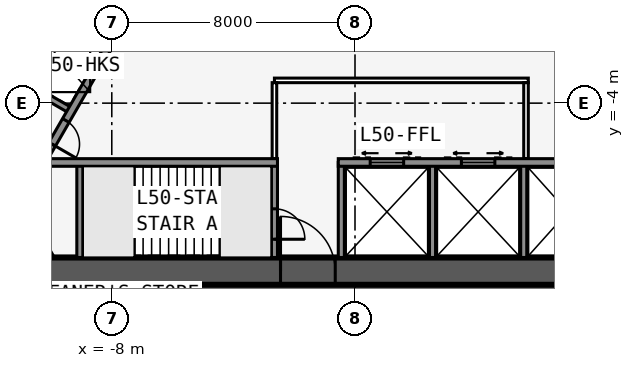
"""IFC4 building model, lengths in metres.
Left out: names, types, materials, properties, quantities, classifications, styles, units other than length and angle.
Written with IfcOpenShell. Run it as: python <this file> out.ifc"""

import sys

from ifc_helpers import new_model, si_unit, direction, frame, frame_2d, origin, place, context, subcontext, project, spatial, rectangle, extrude, element, fill, save


model = new_model("IFC4")
c1 = context("Model", 3, precision=1e-05, world=origin(), true_north=direction((0.0, 1.0)))
c2 = subcontext(c1, "Body", "Model", "MODEL_VIEW")
j1 = project(units=[si_unit("LENGTHUNIT", "METRE"), si_unit("PLANEANGLEUNIT", "RADIAN")], contexts=[c1])
p1 = place(None, origin())
s1 = spatial("IfcSite", under=j1, at=p1, CompositionType="ELEMENT")
p2 = place(p1, origin())
s2 = spatial("IfcBuilding", under=s1, at=p2, CompositionType="ELEMENT")
p3 = place(p2, frame((0.0, 0.0, 186.1)))
s3 = spatial("IfcBuildingStorey", under=s2, at=p3, CompositionType="ELEMENT", Elevation=186.1)
p4 = place(p3, frame((-16.5, -9.526, 0.0), z_axis=(0.0, 0.0, 1.0), x_axis=(1.0, 0.0, 0.0)))
e1 = element("IfcWall", 1, at=p4, inside=s3, PredefinedType="SHEAR", context=c2, shape_type="SweptSolid", body=[
    extrude(rectangle(XDim=33.0, YDim=0.9, at=frame_2d((16.5, 0.0))), origin(), (0.0, 0.0, 1.0), 3.4),
])
p5 = place(p4, frame((14.05, 0.0, 0.0)))
e2 = element("IfcOpeningElement", 2, at=p5, cuts=e1, PredefinedType="OPENING", context=c2, shape_type="SweptSolid", body=[
    extrude(rectangle(XDim=1.8, YDim=2.13, at=frame_2d((0.9, 1.065))), frame((0.0, 0.46, 0.0), z_axis=(0.0, -1.0, 0.0), x_axis=(1.0, 0.0, 0.0)), (0.0, 0.0, 1.0), 0.92),
])
p6 = place(p3, frame((-10.183, -5.951, 0.0), z_axis=(0.0, 0.0, 1.0), x_axis=(1.0, 0.0, 0.0)))
e3 = element("IfcWall", 3, at=p6, inside=s3, PredefinedType="SOLIDWALL", context=c2, shape_type="SweptSolid", body=[
    extrude(rectangle(XDim=7.633, YDim=0.25, at=frame_2d((3.816, 0.0))), origin(), (0.0, 0.0, 1.0), 3.15),
])
p7 = place(p3, frame((-0.55, -5.951, 0.0), z_axis=(0.0, 0.0, 1.0), x_axis=(1.0, 0.0, 0.0)))
e4 = element("IfcWall", 4, at=p7, inside=s3, PredefinedType="SOLIDWALL", context=c2, shape_type="SweptSolid", body=[
    extrude(rectangle(XDim=10.733, YDim=0.25, at=frame_2d((5.366, 0.0))), origin(), (0.0, 0.0, 1.0), 3.15),
])
p8 = place(p7, frame((9.314, 0.0, 0.0)))
e5 = element("IfcOpeningElement", 5, at=p8, cuts=e4, PredefinedType="OPENING", context=c2, shape_type="SweptSolid", body=[
    extrude(rectangle(XDim=0.9, YDim=2.13, at=frame_2d((0.45, 1.065))), frame((0.0, 0.135, 0.0), z_axis=(0.0, -1.0, 0.0), x_axis=(1.0, 0.0, 0.0)), (0.0, 0.0, 1.0), 0.27),
])
p9 = place(p7, frame((1.05, 0.0, 0.0)))
e6 = element("IfcOpeningElement", 6, at=p9, cuts=e4, PredefinedType="OPENING", context=c2, shape_type="SweptSolid", body=[
    extrude(rectangle(XDim=1.1, YDim=2.13, at=frame_2d((0.55, 1.065))), frame((0.0, 0.135, 0.0), z_axis=(0.0, -1.0, 0.0), x_axis=(1.0, 0.0, 0.0)), (0.0, 0.0, 1.0), 0.27),
])
p10 = place(p7, frame((4.05, 0.0, 0.0)))
e7 = element("IfcOpeningElement", 7, at=p10, cuts=e4, PredefinedType="OPENING", context=c2, shape_type="SweptSolid", body=[
    extrude(rectangle(XDim=1.1, YDim=2.13, at=frame_2d((0.55, 1.065))), frame((0.0, 0.135, 0.0), z_axis=(0.0, -1.0, 0.0), x_axis=(1.0, 0.0, 0.0)), (0.0, 0.0, 1.0), 0.27),
])
p11 = place(p3, frame((-9.05, -5.951, 0.0), z_axis=(0.0, 0.0, 1.0), x_axis=(0.0, -1.0, 0.0)))
e8 = element("IfcWall", 8, at=p11, inside=s3, PredefinedType="SOLIDWALL", context=c2, shape_type="SweptSolid", body=[
    extrude(rectangle(XDim=3.125, YDim=0.2, at=frame_2d((1.562, 0.0))), origin(), (0.0, 0.0, 1.0), 3.15),
])
p12 = place(p3, frame((-2.65, -5.951, 0.0), z_axis=(0.0, 0.0, 1.0), x_axis=(0.0, -1.0, 0.0)))
e9 = element("IfcWall", 9, at=p12, inside=s3, PredefinedType="SOLIDWALL", context=c2, shape_type="SweptSolid", body=[
    extrude(rectangle(XDim=3.125, YDim=0.2, at=frame_2d((1.562, 0.0))), origin(), (0.0, 0.0, 1.0), 3.15),
])
p13 = place(p12, frame((1.525, 0.0, 0.0)))
e10 = element("IfcOpeningElement", 10, at=p13, cuts=e9, PredefinedType="OPENING", context=c2, shape_type="SweptSolid", body=[
    extrude(rectangle(XDim=1.0, YDim=2.13, at=frame_2d((0.5, 1.065))), frame((0.0, 0.11, 0.0), z_axis=(0.0, -1.0, 0.0), x_axis=(1.0, 0.0, 0.0)), (0.0, 0.0, 1.0), 0.22),
])
for number, where, z_axis, x_axis in (
    (11, (-0.45, -5.951, 0.0), (0.0, 0.0, 1.0), (0.0, -1.0, 0.0)),
    (12, (2.55, -5.951, 0.0), (0.0, 0.0, 1.0), (0.0, -1.0, 0.0)),
    (13, (5.55, -5.951, 0.0), (0.0, 0.0, 1.0), (0.0, -1.0, 0.0)),
):
    element("IfcWall", number, at=place(p3, frame(where, z_axis=z_axis, x_axis=x_axis)), inside=s3, PredefinedType="SOLIDWALL", context=c2, shape_type="SweptSolid", body=[
        extrude(rectangle(XDim=3.125, YDim=0.2, at=frame_2d((1.562, 0.0))), origin(), (0.0, 0.0, 1.0), 3.15),
    ])
p14 = place(p3, frame((16.5, -9.526, 0.0), z_axis=(0.0, 0.0, 1.0), x_axis=(-0.499999749417, 0.866025548458, 0.0)))
e14 = element("IfcWall", 14, at=p14, inside=s3, PredefinedType="SHEAR", context=c2, shape_type="SweptSolid", body=[
    extrude(rectangle(XDim=33.0, YDim=0.9, at=frame_2d((16.5, 0.0))), origin(), (0.0, 0.0, 1.0), 3.4),
])
p15 = place(p14, frame((14.15, 0.0, 0.0)))
e15 = element("IfcOpeningElement", 15, at=p15, cuts=e14, PredefinedType="OPENING", context=c2, shape_type="SweptSolid", body=[
    extrude(rectangle(XDim=1.8, YDim=2.13, at=frame_2d((0.9, 1.065))), frame((0.0, 0.46, 0.0), z_axis=(0.0, -1.0, 0.0), x_axis=(1.0, 0.0, 0.0)), (0.0, 0.0, 1.0), 0.92),
])
p16 = place(p14, frame((12.6, 0.0, 0.0)))
e16 = element("IfcOpeningElement", 16, at=p16, cuts=e14, PredefinedType="OPENING", context=c2, shape_type="SweptSolid", body=[
    extrude(rectangle(XDim=1.0, YDim=2.13, at=frame_2d((0.5, 1.065))), frame((0.0, 0.46, 0.0), z_axis=(0.0, -1.0, 0.0), x_axis=(1.0, 0.0, 0.0)), (0.0, 0.0, 1.0), 0.92),
])
p17 = place(p3, frame((10.245, -5.843, 0.0), z_axis=(0.0, 0.0, 1.0), x_axis=(-0.499993009313, 0.866029439822, 0.0)))
e17 = element("IfcWall", 17, at=p17, inside=s3, PredefinedType="SOLIDWALL", context=c2, shape_type="SweptSolid", body=[
    extrude(rectangle(XDim=7.733, YDim=0.25, at=frame_2d((3.866, 0.0))), origin(), (0.0, 0.0, 1.0), 3.15),
])
p18 = place(p3, frame((0.0, 19.052, 0.0), z_axis=(0.0, 0.0, 1.0), x_axis=(-0.499999749417, -0.866025548458, 0.0)))
e18 = element("IfcWall", 18, at=p18, inside=s3, PredefinedType="SHEAR", context=c2, shape_type="SweptSolid", body=[
    extrude(rectangle(XDim=33.0, YDim=0.9, at=frame_2d((16.5, 0.0))), origin(), (0.0, 0.0, 1.0), 3.4),
])
p19 = place(p18, frame((14.15, 0.0, 0.0)))
e19 = element("IfcOpeningElement", 19, at=p19, cuts=e18, PredefinedType="OPENING", context=c2, shape_type="SweptSolid", body=[
    extrude(rectangle(XDim=1.8, YDim=2.13, at=frame_2d((0.9, 1.065))), frame((0.0, 0.46, 0.0), z_axis=(0.0, -1.0, 0.0), x_axis=(1.0, 0.0, 0.0)), (0.0, 0.0, 1.0), 0.92),
])
p20 = place(p18, frame((12.6, 0.0, 0.0)))
e20 = element("IfcOpeningElement", 20, at=p20, cuts=e18, PredefinedType="OPENING", context=c2, shape_type="SweptSolid", body=[
    extrude(rectangle(XDim=1.0, YDim=2.13, at=frame_2d((0.5, 1.065))), frame((0.0, 0.46, 0.0), z_axis=(0.0, -1.0, 0.0), x_axis=(1.0, 0.0, 0.0)), (0.0, 0.0, 1.0), 0.92),
])
p21 = place(p3, frame((-4.929, 3.365, 0.0), z_axis=(0.0, 0.0, 1.0), x_axis=(-0.499991433582, -0.866030349552, 0.0)))
e21 = element("IfcWall", 21, at=p21, inside=s3, PredefinedType="SOLIDWALL", context=c2, shape_type="SweptSolid", body=[
    extrude(rectangle(XDim=10.633, YDim=0.25, at=frame_2d((5.316, 0.0))), origin(), (0.0, 0.0, 1.0), 3.15),
])
p22 = place(p21, frame((9.164, 0.0, 0.0)))
e22 = element("IfcOpeningElement", 22, at=p22, cuts=e21, PredefinedType="OPENING", context=c2, shape_type="SweptSolid", body=[
    extrude(rectangle(XDim=0.9, YDim=2.13, at=frame_2d((0.45, 1.065))), frame((0.0, 0.135, 0.0), z_axis=(0.0, -1.0, 0.0), x_axis=(1.0, 0.0, 0.0)), (0.0, 0.0, 1.0), 0.27),
])
p23 = place(p3, frame((-9.329, -4.256, 0.0), z_axis=(0.0, 0.0, 1.0), x_axis=(-0.866022959057, 0.500004234368, 0.0)))
e23 = element("IfcWall", 23, at=p23, inside=s3, PredefinedType="SOLIDWALL", context=c2, shape_type="SweptSolid", body=[
    extrude(rectangle(XDim=3.125, YDim=0.2, at=frame_2d((1.562, 0.0))), origin(), (0.0, 0.0, 1.0), 3.15),
])
p24 = place(p3, frame((20.027, -10.985, 0.0), z_axis=(0.0, 0.0, 1.0), x_axis=(-0.500001677587, 0.866024435227, 0.0)))
e24 = element("IfcWall", 24, at=p24, inside=s3, PredefinedType="PARTITIONING", context=c2, shape_type="SweptSolid", body=[
    extrude(rectangle(XDim=39.054, YDim=0.15, at=frame_2d((19.527, 0.0))), origin(), (0.0, 0.0, 1.0), 3.15),
])
p25 = place(p24, frame((1.558, 0.0, 0.0)))
e25 = element("IfcOpeningElement", 25, at=p25, cuts=e24, PredefinedType="OPENING", context=c2, shape_type="SweptSolid", body=[
    extrude(rectangle(XDim=0.95, YDim=2.13, at=frame_2d((0.475, 1.065))), frame((0.0, 0.085, 0.0), z_axis=(0.0, -1.0, 0.0), x_axis=(1.0, 0.0, 0.0)), (0.0, 0.0, 1.0), 0.17),
])
p26 = place(p24, frame((12.752, 0.0, 0.0)))
e26 = element("IfcOpeningElement", 26, at=p26, cuts=e24, PredefinedType="OPENING", context=c2, shape_type="SweptSolid", body=[
    extrude(rectangle(XDim=0.95, YDim=2.13, at=frame_2d((0.475, 1.065))), frame((0.0, 0.085, 0.0), z_axis=(0.0, -1.0, 0.0), x_axis=(1.0, 0.0, 0.0)), (0.0, 0.0, 1.0), 0.17),
])
p27 = place(p24, frame((26.552, 0.0, 0.0)))
e27 = element("IfcOpeningElement", 27, at=p27, cuts=e24, PredefinedType="OPENING", context=c2, shape_type="SweptSolid", body=[
    extrude(rectangle(XDim=0.95, YDim=2.13, at=frame_2d((0.475, 1.065))), frame((0.0, 0.085, 0.0), z_axis=(0.0, -1.0, 0.0), x_axis=(1.0, 0.0, 0.0)), (0.0, 0.0, 1.0), 0.17),
])
p28 = place(p24, frame((37.752, 0.0, 0.0)))
e28 = element("IfcOpeningElement", 28, at=p28, cuts=e24, PredefinedType="OPENING", context=c2, shape_type="SweptSolid", body=[
    extrude(rectangle(XDim=0.95, YDim=2.13, at=frame_2d((0.475, 1.065))), frame((0.0, 0.085, 0.0), z_axis=(0.0, -1.0, 0.0), x_axis=(1.0, 0.0, 0.0)), (0.0, 0.0, 1.0), 0.17),
])
p29 = place(p3, frame((-0.5, 24.636, 0.0), z_axis=(0.0, 0.0, 1.0), x_axis=(-0.500001915564, -0.86602429783, 0.0)))
e29 = element("IfcWall", 29, at=p29, inside=s3, PredefinedType="PARTITIONING", context=c2, shape_type="SweptSolid", body=[
    extrude(rectangle(XDim=42.172, YDim=0.15, at=frame_2d((21.086, 0.0))), origin(), (0.0, 0.0, 1.0), 3.15),
])
p30 = place(p29, frame((2.338, 0.0, 0.0)))
e30 = element("IfcOpeningElement", 30, at=p30, cuts=e29, PredefinedType="OPENING", context=c2, shape_type="SweptSolid", body=[
    extrude(rectangle(XDim=0.95, YDim=2.13, at=frame_2d((0.475, 1.065))), frame((0.0, 0.085, 0.0), z_axis=(0.0, -1.0, 0.0), x_axis=(1.0, 0.0, 0.0)), (0.0, 0.0, 1.0), 0.17),
])
p31 = place(p29, frame((18.111, 0.0, 0.0)))
e31 = element("IfcOpeningElement", 31, at=p31, cuts=e29, PredefinedType="OPENING", context=c2, shape_type="SweptSolid", body=[
    extrude(rectangle(XDim=0.95, YDim=2.13, at=frame_2d((0.475, 1.065))), frame((0.0, 0.085, 0.0), z_axis=(0.0, -1.0, 0.0), x_axis=(1.0, 0.0, 0.0)), (0.0, 0.0, 1.0), 0.17),
])
p32 = place(p29, frame((28.111, 0.0, 0.0)))
e32 = element("IfcOpeningElement", 32, at=p32, cuts=e29, PredefinedType="OPENING", context=c2, shape_type="SweptSolid", body=[
    extrude(rectangle(XDim=0.95, YDim=2.13, at=frame_2d((0.475, 1.065))), frame((0.0, 0.085, 0.0), z_axis=(0.0, -1.0, 0.0), x_axis=(1.0, 0.0, 0.0)), (0.0, 0.0, 1.0), 0.17),
])
p33 = place(p29, frame((39.311, 0.0, 0.0)))
e33 = element("IfcOpeningElement", 33, at=p33, cuts=e29, PredefinedType="OPENING", context=c2, shape_type="SweptSolid", body=[
    extrude(rectangle(XDim=0.95, YDim=2.13, at=frame_2d((0.475, 1.065))), frame((0.0, 0.085, 0.0), z_axis=(0.0, -1.0, 0.0), x_axis=(1.0, 0.0, 0.0)), (0.0, 0.0, 1.0), 0.17),
])
p34 = place(p3, frame((-2.65, -3.251, 0.0), z_axis=(0.0, 0.0, 1.0), x_axis=(1.0, 0.0, 0.0)))
e34 = element("IfcWall", 34, at=p34, inside=s3, PredefinedType="PARTITIONING", context=c2, shape_type="SweptSolid", body=[
    extrude(rectangle(XDim=8.35, YDim=0.15, at=frame_2d((4.175, 0.0))), origin(), (0.0, 0.0, 1.0), 3.15),
])
for number, where, z_axis, x_axis in (
    (35, (-2.65, -5.826, 0.0), (0.0, 0.0, 1.0), (0.0, 1.0, 0.0)),
    (36, (5.625, -5.826, 0.0), (0.0, 0.0, 1.0), (0.0, 1.0, 0.0)),
):
    element("IfcWall", number, at=place(p3, frame(where, z_axis=z_axis, x_axis=x_axis)), inside=s3, PredefinedType="PARTITIONING", context=c2, shape_type="SweptSolid", body=[
        extrude(rectangle(XDim=2.5, YDim=0.15, at=frame_2d((1.25, 0.0))), origin(), (0.0, 0.0, 1.0), 3.15),
    ])
p35 = place(p3, frame((-9.947, -9.076, 0.0), z_axis=(0.0, 0.0, 1.0), x_axis=(-0.500027479704, 0.866009537788, 0.0)))
e37 = element("IfcWall", 37, at=p35, inside=s3, PredefinedType="PARTITIONING", context=c2, shape_type="SweptSolid", body=[
    extrude(rectangle(XDim=5.774, YDim=0.1, at=frame_2d((2.887, 0.0))), origin(), (0.0, 0.0, 1.0), 3.15),
])
p36 = place(p35, frame((2.437, 0.0, 0.0)))
e38 = element("IfcOpeningElement", 38, at=p36, cuts=e37, PredefinedType="OPENING", context=c2, shape_type="SweptSolid", body=[
    extrude(rectangle(XDim=0.9, YDim=2.13, at=frame_2d((0.45, 1.065))), frame((0.0, 0.06, 0.0), z_axis=(0.0, -1.0, 0.0), x_axis=(1.0, 0.0, 0.0)), (0.0, 0.0, 1.0), 0.12),
])
p37 = place(p3, frame((-7.247, -7.576, 0.0), z_axis=(0.0, 0.0, 1.0), x_axis=(1.0, 0.0, 0.0)))
e39 = element("IfcWall", 39, at=p37, inside=s3, PredefinedType="SOLIDWALL", context=c2, shape_type="SweptSolid", body=[
    extrude(rectangle(XDim=2.794, YDim=0.1, at=frame_2d((1.397, 0.0))), origin(), (0.0, 0.0, 1.0), 3.4),
])
p38 = place(p5, origin())
e40 = element("IfcDoor", 40, at=p38, inside=s3, OperationType="DOUBLE_DOOR_SINGLE_SWING", PredefinedType="DOOR", context=c2, shape_type="SweptSolid", body=[
    extrude(rectangle(XDim=1.8, YDim=2.13, at=frame_2d((0.9, 1.065))), frame((0.0, 0.025, 0.0), z_axis=(0.0, -1.0, 0.0), x_axis=(1.0, 0.0, 0.0)), (0.0, 0.0, 1.0), 0.05),
])
fill(e2, e40)
p39 = place(p13, origin())
e41 = element("IfcDoor", 41, at=p39, inside=s3, OperationType="SINGLE_SWING_RIGHT", PredefinedType="DOOR", context=c2, shape_type="SweptSolid", body=[
    extrude(rectangle(XDim=1.0, YDim=2.13, at=frame_2d((0.5, 1.065))), frame((0.0, 0.025, 0.0), z_axis=(0.0, -1.0, 0.0), x_axis=(1.0, 0.0, 0.0)), (0.0, 0.0, 1.0), 0.05),
])
fill(e10, e41)
p40 = place(p22, origin())
e42 = element("IfcDoor", 42, at=p40, inside=s3, OperationType="SINGLE_SWING_RIGHT", PredefinedType="DOOR", context=c2, shape_type="SweptSolid", body=[
    extrude(rectangle(XDim=0.9, YDim=2.13, at=frame_2d((0.45, 1.065))), frame((0.0, 0.025, 0.0), z_axis=(0.0, -1.0, 0.0), x_axis=(1.0, 0.0, 0.0)), (0.0, 0.0, 1.0), 0.05),
])
fill(e22, e42)
p41 = place(p9, origin())
e43 = element("IfcDoor", 43, at=p41, inside=s3, OperationType="DOUBLE_DOOR_SLIDING", PredefinedType="USERDEFINED", context=c2, shape_type="SweptSolid", body=[
    extrude(rectangle(XDim=1.1, YDim=2.13, at=frame_2d((0.55, 1.065))), frame((0.0, 0.025, 0.0), z_axis=(0.0, -1.0, 0.0), x_axis=(1.0, 0.0, 0.0)), (0.0, 0.0, 1.0), 0.05),
])
fill(e6, e43)
p42 = place(p10, origin())
e44 = element("IfcDoor", 44, at=p42, inside=s3, OperationType="DOUBLE_DOOR_SLIDING", PredefinedType="USERDEFINED", context=c2, shape_type="SweptSolid", body=[
    extrude(rectangle(XDim=1.1, YDim=2.13, at=frame_2d((0.55, 1.065))), frame((0.0, 0.025, 0.0), z_axis=(0.0, -1.0, 0.0), x_axis=(1.0, 0.0, 0.0)), (0.0, 0.0, 1.0), 0.05),
])
fill(e7, e44)
save(model, sys.argv[1])
